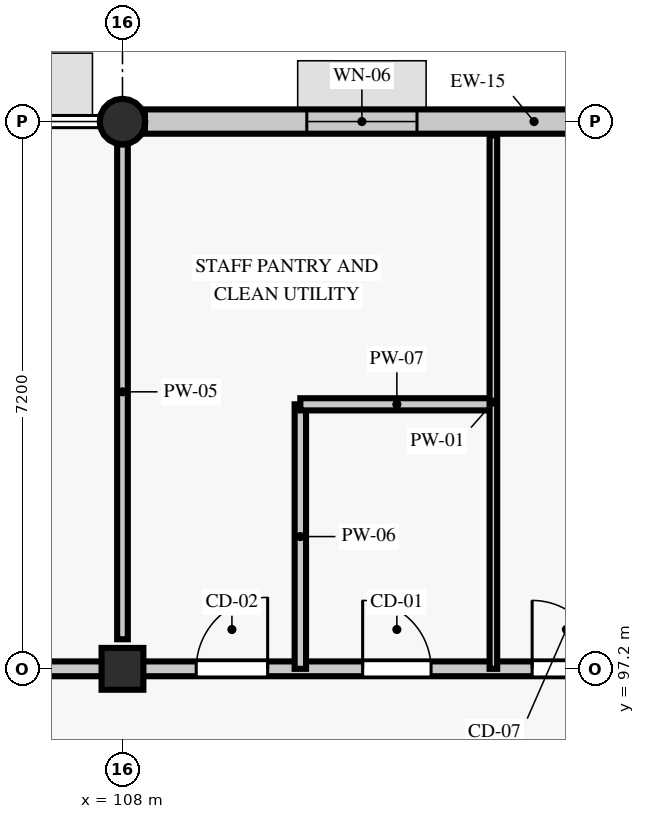
"""IFC4 building model, lengths in metres.
Left out: names, types, materials, properties, quantities, classifications, styles, units other than length and angle.
Written with IfcOpenShell. Run it as: python <this file> out.ifc"""

import sys

from ifc_helpers import new_model, si_unit, direction, frame, frame_2d, origin, origin_2d, place, context, subcontext, project, spatial, rectangle, circle, extrude, element, fill, save


model = new_model("IFC4")
c1 = context("Model", 3, precision=1e-05, world=origin(), true_north=direction((0.0, 1.0)))
c2 = subcontext(c1, "Body", "Model", "MODEL_VIEW")
j1 = project(units=[si_unit("LENGTHUNIT", "METRE"), si_unit("PLANEANGLEUNIT", "RADIAN")], contexts=[c1])
p1 = place(None, origin())
s1 = spatial("IfcSite", under=j1, at=p1, CompositionType="ELEMENT")
p2 = place(p1, origin())
s2 = spatial("IfcBuilding", under=s1, at=p2, CompositionType="ELEMENT")
p3 = place(p2, frame((0.0, 0.0, 18.0)))
s3 = spatial("IfcBuildingStorey", under=s2, at=p3, CompositionType="ELEMENT", Elevation=18.0)
p4 = place(p3, frame((108.0, 97.2, 0.0), z_axis=(0.0, 0.0, 1.0), x_axis=(1.0, 0.0, 0.0)))
e1 = element("IfcColumn", 1, at=p4, inside=s3, PredefinedType="COLUMN", context=c2, shape_type="SweptSolid", body=[
    extrude(rectangle(XDim=0.55, YDim=0.55, at=origin_2d()), origin(), (0.0, 0.0, 1.0), 3.915),
])
p5 = place(p3, frame((108.0, 104.4, 0.0), z_axis=(0.0, 0.0, 1.0), x_axis=(1.0, 0.0, 0.0)))
e2 = element("IfcColumn", 2, at=p5, inside=s3, PredefinedType="COLUMN", context=c2, shape_type="SweptSolid", body=[
    extrude(circle(Radius=0.3, at=origin_2d()), origin(), (0.0, 0.0, 1.0), 3.915),
])
p6 = place(p3, frame((114.905, 104.4, 0.0), z_axis=(0.0, 0.0, 1.0), x_axis=(-1.0, 0.0, 0.0)))
e3 = element("IfcWall", 3, at=p6, inside=s3, PredefinedType="STANDARD", context=c2, shape_type="SweptSolid", body=[
    extrude(rectangle(XDim=6.61, YDim=0.32, at=frame_2d((3.305, 0.0))), origin(), (0.0, 0.0, 1.0), 3.265),
])
p7 = place(p6, frame((3.03, 0.0, 0.9)))
e4 = element("IfcOpeningElement", 4, at=p7, cuts=e3, PredefinedType="OPENING", context=c2, shape_type="SweptSolid", body=[
    extrude(rectangle(XDim=1.45, YDim=1.3, at=frame_2d((0.725, 0.65))), frame((0.0, 0.17, 0.0), z_axis=(0.0, -1.0, 0.0), x_axis=(1.0, 0.0, 0.0)), (0.0, 0.0, 1.0), 0.34),
])
p8 = place(p3, frame((93.9, 97.2, 0.0), z_axis=(0.0, 0.0, 1.0), x_axis=(1.0, 0.0, 0.0)))
e5 = element("IfcWall", 5, at=p8, inside=s3, PredefinedType="PARTITIONING", context=c2, shape_type="SweptSolid", body=[
    extrude(rectangle(XDim=28.2, YDim=0.195, at=frame_2d((14.1, 0.0))), origin(), (0.0, 0.0, 1.0), 3.165),
])
p9 = place(p8, frame((2.646, 0.0, 0.0)))
e6 = element("IfcOpeningElement", 6, at=p9, cuts=e5, PredefinedType="OPENING", context=c2, shape_type="SweptSolid", body=[
    extrude(rectangle(XDim=1.02, YDim=2.08, at=frame_2d((0.51, 1.04))), frame((0.0, 0.107, 0.0), z_axis=(0.0, -1.0, 0.0), x_axis=(1.0, 0.0, 0.0)), (0.0, 0.0, 1.0), 0.215),
])
p10 = place(p8, frame((10.101, 0.0, 0.0)))
e7 = element("IfcOpeningElement", 7, at=p10, cuts=e5, PredefinedType="OPENING", context=c2, shape_type="SweptSolid", body=[
    extrude(rectangle(XDim=1.06, YDim=2.08, at=frame_2d((0.53, 1.04))), frame((0.0, 0.107, 0.0), z_axis=(0.0, -1.0, 0.0), x_axis=(1.0, 0.0, 0.0)), (0.0, 0.0, 1.0), 0.215),
])
p11 = place(p8, frame((15.07, 0.0, 0.0)))
e8 = element("IfcOpeningElement", 8, at=p11, cuts=e5, PredefinedType="OPENING", context=c2, shape_type="SweptSolid", body=[
    extrude(rectangle(XDim=0.94, YDim=2.08, at=frame_2d((0.47, 1.04))), frame((0.0, 0.107, 0.0), z_axis=(0.0, -1.0, 0.0), x_axis=(1.0, 0.0, 0.0)), (0.0, 0.0, 1.0), 0.215),
])
p12 = place(p8, frame((17.26, 0.0, 0.0)))
e9 = element("IfcOpeningElement", 9, at=p12, cuts=e5, PredefinedType="OPENING", context=c2, shape_type="SweptSolid", body=[
    extrude(rectangle(XDim=0.9, YDim=2.08, at=frame_2d((0.45, 1.04))), frame((0.0, 0.107, 0.0), z_axis=(0.0, -1.0, 0.0), x_axis=(1.0, 0.0, 0.0)), (0.0, 0.0, 1.0), 0.215),
])
p13 = place(p8, frame((19.49, 0.0, 0.0)))
e10 = element("IfcOpeningElement", 10, at=p13, cuts=e5, PredefinedType="OPENING", context=c2, shape_type="SweptSolid", body=[
    extrude(rectangle(XDim=0.9, YDim=2.13, at=frame_2d((0.45, 1.065))), frame((0.0, 0.107, 0.0), z_axis=(0.0, -1.0, 0.0), x_axis=(1.0, 0.0, 0.0)), (0.0, 0.0, 1.0), 0.215),
])
p14 = place(p8, frame((24.357, 0.0, 0.0)))
e11 = element("IfcOpeningElement", 11, at=p14, cuts=e5, PredefinedType="OPENING", context=c2, shape_type="SweptSolid", body=[
    extrude(rectangle(XDim=1.0, YDim=2.13, at=frame_2d((0.5, 1.065))), frame((0.0, 0.107, 0.0), z_axis=(0.0, -1.0, 0.0), x_axis=(1.0, 0.0, 0.0)), (0.0, 0.0, 1.0), 0.215),
])
p15 = place(p3, frame((108.0, 97.589, 0.0), z_axis=(0.0, 0.0, 1.0), x_axis=(0.0, 1.0, 0.0)))
e12 = element("IfcWall", 12, at=p15, inside=s3, PredefinedType="PARTITIONING", context=c2, shape_type="SweptSolid", body=[
    extrude(rectangle(XDim=6.511, YDim=0.14, at=frame_2d((3.256, 0.0))), origin(), (0.0, 0.0, 1.0), 3.365),
])
p16 = place(p3, frame((110.34, 97.2, 0.0), z_axis=(0.0, 0.0, 1.0), x_axis=(0.0, 1.0, 0.0)))
e13 = element("IfcWall", 13, at=p16, inside=s3, PredefinedType="PARTITIONING", context=c2, shape_type="SweptSolid", body=[
    extrude(rectangle(XDim=3.48, YDim=0.15, at=frame_2d((1.74, 0.0))), origin(), (0.0, 0.0, 1.0), 3.165),
])
p17 = place(p3, frame((110.34, 100.68, 0.0), z_axis=(0.0, 0.0, 1.0), x_axis=(1.0, 0.0, 0.0)))
e14 = element("IfcWall", 14, at=p17, inside=s3, PredefinedType="PARTITIONING", context=c2, shape_type="SweptSolid", body=[
    extrude(rectangle(XDim=2.54, YDim=0.16, at=frame_2d((1.27, 0.0))), origin(), (0.0, 0.0, 1.0), 3.615),
])
p18 = place(p3, frame((112.88, 97.2, 0.0), z_axis=(0.0, 0.0, 1.0), x_axis=(0.0, 1.0, 0.0)))
e15 = element("IfcWall", 15, at=p18, inside=s3, PredefinedType="PARTITIONING", context=c2, shape_type="SweptSolid", body=[
    extrude(rectangle(XDim=7.018, YDim=0.1, at=frame_2d((3.509, 0.0))), origin(), (0.0, 0.0, 1.0), 3.165),
])
p19 = place(p7, origin())
e16 = element("IfcWindow", 16, at=p19, inside=s3, PartitioningType="SINGLE_PANEL", PredefinedType="WINDOW", context=c2, shape_type="SweptSolid", body=[
    extrude(rectangle(XDim=1.45, YDim=1.3, at=frame_2d((0.725, 0.65))), frame((0.0, 0.03, 0.0), z_axis=(0.0, -1.0, 0.0), x_axis=(1.0, 0.0, 0.0)), (0.0, 0.0, 1.0), 0.06),
])
fill(e4, e16)
p20 = place(p11, origin())
e17 = element("IfcDoor", 17, at=p20, inside=s3, OperationType="SINGLE_SWING_RIGHT", PredefinedType="DOOR", context=c2, shape_type="SweptSolid", body=[
    extrude(rectangle(XDim=0.94, YDim=2.08, at=frame_2d((0.47, 1.04))), frame((0.0, 0.025, 0.0), z_axis=(0.0, -1.0, 0.0), x_axis=(1.0, 0.0, 0.0)), (0.0, 0.0, 1.0), 0.05),
])
fill(e8, e17)
p21 = place(p12, origin())
e18 = element("IfcDoor", 18, at=p21, inside=s3, OperationType="SINGLE_SWING_LEFT", PredefinedType="DOOR", context=c2, shape_type="SweptSolid", body=[
    extrude(rectangle(XDim=0.9, YDim=2.08, at=frame_2d((0.45, 1.04))), frame((0.0, 0.025, 0.0), z_axis=(0.0, -1.0, 0.0), x_axis=(1.0, 0.0, 0.0)), (0.0, 0.0, 1.0), 0.05),
])
fill(e9, e18)
p22 = place(p13, origin())
e19 = element("IfcDoor", 19, at=p22, inside=s3, OperationType="SINGLE_SWING_LEFT", PredefinedType="DOOR", context=c2, shape_type="SweptSolid", body=[
    extrude(rectangle(XDim=0.9, YDim=2.13, at=frame_2d((0.45, 1.065))), frame((0.0, 0.025, 0.0), z_axis=(0.0, -1.0, 0.0), x_axis=(1.0, 0.0, 0.0)), (0.0, 0.0, 1.0), 0.05),
])
fill(e10, e19)
save(model, sys.argv[1])
